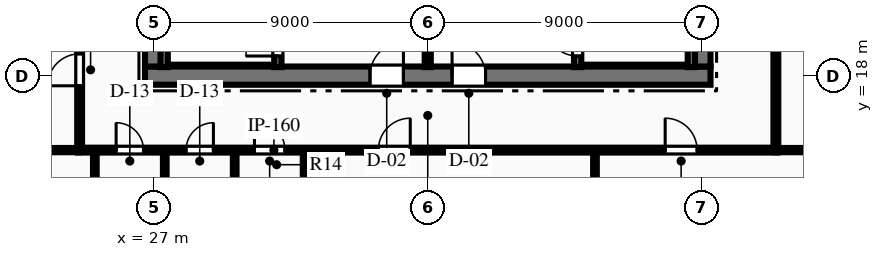
"""IFC4 building model, lengths in metres.
Left out: names, types, materials, properties, quantities, classifications, styles, units other than length and angle.
Written with IfcOpenShell. Run it as: python <this file> out.ifc"""

import sys

from ifc_helpers import new_model, si_unit, direction, frame, frame_2d, origin, place, context, subcontext, project, spatial, rectangle, extrude, element, fill, save


model = new_model("IFC4")
c1 = context("Model", 3, precision=1e-05, world=origin(), true_north=direction((0.0, 1.0)))
c2 = subcontext(c1, "Body", "Model", "MODEL_VIEW")
j1 = project(units=[si_unit("LENGTHUNIT", "METRE"), si_unit("PLANEANGLEUNIT", "RADIAN")], contexts=[c1])
p1 = place(None, origin())
s1 = spatial("IfcSite", under=j1, at=p1, CompositionType="ELEMENT")
p2 = place(p1, origin())
s2 = spatial("IfcBuilding", under=s1, at=p2, CompositionType="ELEMENT")
p3 = place(p2, frame((0.0, 0.0, 40.2)))
s3 = spatial("IfcBuildingStorey", under=s2, at=p3, CompositionType="ELEMENT", Elevation=40.2)
p4 = place(p3, frame((26.7, 18.0, 0.0), z_axis=(0.0, 0.0, 1.0), x_axis=(1.0, 0.0, 0.0)))
e1 = element("IfcWall", 1, at=p4, inside=s3, PredefinedType="SHEAR", context=c2, shape_type="SweptSolid", body=[
    extrude(rectangle(XDim=18.6, YDim=0.6, at=frame_2d((9.3, 0.0))), origin(), (0.0, 0.0, 1.0), 3.75),
])
p5 = place(p4, frame((7.4, 0.0, 0.0)))
e2 = element("IfcOpeningElement", 2, at=p5, cuts=e1, PredefinedType="OPENING", context=c2, shape_type="SweptSolid", body=[
    extrude(rectangle(XDim=1.1, YDim=2.15, at=frame_2d((0.55, 1.075))), frame((0.0, 0.31, 0.0), z_axis=(0.0, -1.0, 0.0), x_axis=(1.0, 0.0, 0.0)), (0.0, 0.0, 1.0), 0.62),
])
p6 = place(p4, frame((10.1, 0.0, 0.0)))
e3 = element("IfcOpeningElement", 3, at=p6, cuts=e1, PredefinedType="OPENING", context=c2, shape_type="SweptSolid", body=[
    extrude(rectangle(XDim=1.1, YDim=2.15, at=frame_2d((0.55, 1.075))), frame((0.0, 0.31, 0.0), z_axis=(0.0, -1.0, 0.0), x_axis=(1.0, 0.0, 0.0)), (0.0, 0.0, 1.0), 0.62),
])
p7 = place(p3, frame((27.0, 18.3, 0.0), z_axis=(0.0, 0.0, 1.0), x_axis=(0.0, 1.0, 0.0)))
e4 = element("IfcWall", 4, at=p7, inside=s3, PredefinedType="SHEAR", context=c2, shape_type="SweptSolid", body=[
    extrude(rectangle(XDim=15.4, YDim=0.6, at=frame_2d((7.7, 0.0))), origin(), (0.0, 0.0, 1.0), 3.75),
])
p8 = place(p7, frame((9.94, 0.0, 0.0)))
e5 = element("IfcOpeningElement", 5, at=p8, cuts=e4, PredefinedType="OPENING", context=c2, shape_type="SweptSolid", body=[
    extrude(rectangle(XDim=1.4, YDim=2.2, at=frame_2d((0.7, 1.1))), frame((0.0, 0.31, 0.0), z_axis=(0.0, -1.0, 0.0), x_axis=(1.0, 0.0, 0.0)), (0.0, 0.0, 1.0), 0.62),
])
p9 = place(p3, frame((45.0, 18.3, 0.0), z_axis=(0.0, 0.0, 1.0), x_axis=(0.0, 1.0, 0.0)))
e6 = element("IfcWall", 6, at=p9, inside=s3, PredefinedType="SHEAR", context=c2, shape_type="SweptSolid", body=[
    extrude(rectangle(XDim=15.4, YDim=0.6, at=frame_2d((7.7, 0.0))), origin(), (0.0, 0.0, 1.0), 3.75),
])
p10 = place(p9, frame((9.94, 0.0, 0.0)))
e7 = element("IfcOpeningElement", 7, at=p10, cuts=e6, PredefinedType="OPENING", context=c2, shape_type="SweptSolid", body=[
    extrude(rectangle(XDim=1.4, YDim=2.2, at=frame_2d((0.7, 1.1))), frame((0.0, 0.31, 0.0), z_axis=(0.0, -1.0, 0.0), x_axis=(1.0, 0.0, 0.0)), (0.0, 0.0, 1.0), 0.62),
])
p11 = place(p3, frame((31.07, 18.28, 0.0), z_axis=(0.0, 0.0, 1.0), x_axis=(0.0, 1.0, 0.0)))
e8 = element("IfcWall", 8, at=p11, inside=s3, PredefinedType="SHEAR", context=c2, shape_type="SweptSolid", body=[
    extrude(rectangle(XDim=8.26, YDim=0.24, at=frame_2d((4.13, 0.0))), origin(), (0.0, 0.0, 1.0), 3.75),
])
p12 = place(p11, frame((0.365, 0.0, 0.0)))
e9 = element("IfcOpeningElement", 9, at=p12, cuts=e8, PredefinedType="OPENING", context=c2, shape_type="SweptSolid", body=[
    extrude(rectangle(XDim=1.05, YDim=2.15, at=frame_2d((0.525, 1.075))), frame((0.0, 0.13, 0.0), z_axis=(0.0, -1.0, 0.0), x_axis=(1.0, 0.0, 0.0)), (0.0, 0.0, 1.0), 0.26),
])
p13 = place(p3, frame((27.33, 18.28, 0.0), z_axis=(0.0, 0.0, 1.0), x_axis=(0.0, 1.0, 0.0)))
e10 = element("IfcWall", 10, at=p13, inside=s3, PredefinedType="SHEAR", context=c2, shape_type="SweptSolid", body=[
    extrude(rectangle(XDim=8.26, YDim=0.24, at=frame_2d((4.13, 0.0))), origin(), (0.0, 0.0, 1.0), 3.75),
])
p14 = place(p3, frame((40.93, 18.28, 0.0), z_axis=(0.0, 0.0, 1.0), x_axis=(0.0, 1.0, 0.0)))
e11 = element("IfcWall", 11, at=p14, inside=s3, PredefinedType="SHEAR", context=c2, shape_type="SweptSolid", body=[
    extrude(rectangle(XDim=8.26, YDim=0.24, at=frame_2d((4.13, 0.0))), origin(), (0.0, 0.0, 1.0), 3.75),
])
p15 = place(p14, frame((0.365, 0.0, 0.0)))
e12 = element("IfcOpeningElement", 12, at=p15, cuts=e11, PredefinedType="OPENING", context=c2, shape_type="SweptSolid", body=[
    extrude(rectangle(XDim=1.05, YDim=2.15, at=frame_2d((0.525, 1.075))), frame((0.0, 0.13, 0.0), z_axis=(0.0, -1.0, 0.0), x_axis=(1.0, 0.0, 0.0)), (0.0, 0.0, 1.0), 0.26),
])
p16 = place(p3, frame((44.67, 18.28, 0.0), z_axis=(0.0, 0.0, 1.0), x_axis=(0.0, 1.0, 0.0)))
e13 = element("IfcWall", 13, at=p16, inside=s3, PredefinedType="SHEAR", context=c2, shape_type="SweptSolid", body=[
    extrude(rectangle(XDim=8.26, YDim=0.24, at=frame_2d((4.13, 0.0))), origin(), (0.0, 0.0, 1.0), 3.75),
])
p17 = place(p3, frame((36.0, 18.28, 0.0), z_axis=(0.0, 0.0, 1.0), x_axis=(0.0, 1.0, 0.0)))
e14 = element("IfcWall", 14, at=p17, inside=s3, PredefinedType="PARTITIONING", context=c2, shape_type="SweptSolid", body=[
    extrude(rectangle(XDim=3.77, YDim=0.2, at=frame_2d((1.885, 0.0))), origin(), (0.0, 0.0, 1.0), 3.44),
])
p18 = place(p3, frame((24.5, 15.55, 0.0), z_axis=(0.0, 0.0, 1.0), x_axis=(1.0, 0.0, 0.0)))
e15 = element("IfcWall", 15, at=p18, inside=s3, PredefinedType="PARTITIONING", context=c2, shape_type="SweptSolid", body=[
    extrude(rectangle(XDim=23.0, YDim=0.16, at=frame_2d((11.5, 0.0))), origin(), (0.0, 0.0, 1.0), 3.44),
])
p19 = place(p18, frame((1.25, 0.0, 0.0)))
e16 = element("IfcOpeningElement", 16, at=p19, cuts=e15, PredefinedType="OPENING", context=c2, shape_type="SweptSolid", body=[
    extrude(rectangle(XDim=0.9, YDim=2.15, at=frame_2d((0.45, 1.075))), frame((0.0, 0.09, 0.0), z_axis=(0.0, -1.0, 0.0), x_axis=(1.0, 0.0, 0.0)), (0.0, 0.0, 1.0), 0.18),
])
p20 = place(p18, frame((3.55, 0.0, 0.0)))
e17 = element("IfcOpeningElement", 17, at=p20, cuts=e15, PredefinedType="OPENING", context=c2, shape_type="SweptSolid", body=[
    extrude(rectangle(XDim=0.9, YDim=2.15, at=frame_2d((0.45, 1.075))), frame((0.0, 0.09, 0.0), z_axis=(0.0, -1.0, 0.0), x_axis=(1.0, 0.0, 0.0)), (0.0, 0.0, 1.0), 0.18),
])
p21 = place(p18, frame((5.8, 0.0, 0.0)))
e18 = element("IfcOpeningElement", 18, at=p21, cuts=e15, PredefinedType="OPENING", context=c2, shape_type="SweptSolid", body=[
    extrude(rectangle(XDim=1.0, YDim=2.15, at=frame_2d((0.5, 1.075))), frame((0.0, 0.09, 0.0), z_axis=(0.0, -1.0, 0.0), x_axis=(1.0, 0.0, 0.0)), (0.0, 0.0, 1.0), 0.18),
])
p22 = place(p18, frame((9.875, 0.0, 0.0)))
e19 = element("IfcOpeningElement", 19, at=p22, cuts=e15, PredefinedType="OPENING", context=c2, shape_type="SweptSolid", body=[
    extrude(rectangle(XDim=1.05, YDim=2.15, at=frame_2d((0.525, 1.075))), frame((0.0, 0.09, 0.0), z_axis=(0.0, -1.0, 0.0), x_axis=(1.0, 0.0, 0.0)), (0.0, 0.0, 1.0), 0.18),
])
p23 = place(p18, frame((19.309, 0.0, 0.0)))
e20 = element("IfcOpeningElement", 20, at=p23, cuts=e15, PredefinedType="OPENING", context=c2, shape_type="SweptSolid", body=[
    extrude(rectangle(XDim=1.05, YDim=2.15, at=frame_2d((0.525, 1.075))), frame((0.0, 0.09, 0.0), z_axis=(0.0, -1.0, 0.0), x_axis=(1.0, 0.0, 0.0)), (0.0, 0.0, 1.0), 0.18),
])
p24 = place(p3, frame((24.55, 15.55, 0.0), z_axis=(0.0, 0.0, 1.0), x_axis=(0.0, 1.0, 0.0)))
e21 = element("IfcWall", 21, at=p24, inside=s3, PredefinedType="PARTITIONING", context=c2, shape_type="SweptSolid", body=[
    extrude(rectangle(XDim=20.9, YDim=0.16, at=frame_2d((10.45, 0.0))), origin(), (0.0, 0.0, 1.0), 3.44),
])
p25 = place(p24, frame((2.116, 0.0, 0.0)))
e22 = element("IfcOpeningElement", 22, at=p25, cuts=e21, PredefinedType="OPENING", context=c2, shape_type="SweptSolid", body=[
    extrude(rectangle(XDim=1.05, YDim=2.15, at=frame_2d((0.525, 1.075))), frame((0.0, 0.09, 0.0), z_axis=(0.0, -1.0, 0.0), x_axis=(1.0, 0.0, 0.0)), (0.0, 0.0, 1.0), 0.18),
])
p26 = place(p24, frame((8.625, 0.0, 0.0)))
e23 = element("IfcOpeningElement", 23, at=p26, cuts=e21, PredefinedType="OPENING", context=c2, shape_type="SweptSolid", body=[
    extrude(rectangle(XDim=1.05, YDim=2.15, at=frame_2d((0.525, 1.075))), frame((0.0, 0.09, 0.0), z_axis=(0.0, -1.0, 0.0), x_axis=(1.0, 0.0, 0.0)), (0.0, 0.0, 1.0), 0.18),
])
p27 = place(p24, frame((13.945, 0.0, 0.0)))
e24 = element("IfcOpeningElement", 24, at=p27, cuts=e21, PredefinedType="OPENING", context=c2, shape_type="SweptSolid", body=[
    extrude(rectangle(XDim=1.05, YDim=2.15, at=frame_2d((0.525, 1.075))), frame((0.0, 0.09, 0.0), z_axis=(0.0, -1.0, 0.0), x_axis=(1.0, 0.0, 0.0)), (0.0, 0.0, 1.0), 0.18),
])
p28 = place(p24, frame((16.783, 0.0, 0.0)))
e25 = element("IfcOpeningElement", 25, at=p28, cuts=e21, PredefinedType="OPENING", context=c2, shape_type="SweptSolid", body=[
    extrude(rectangle(XDim=1.05, YDim=2.15, at=frame_2d((0.525, 1.075))), frame((0.0, 0.09, 0.0), z_axis=(0.0, -1.0, 0.0), x_axis=(1.0, 0.0, 0.0)), (0.0, 0.0, 1.0), 0.18),
])
p29 = place(p3, frame((47.45, 15.55, 0.0), z_axis=(0.0, 0.0, 1.0), x_axis=(0.0, 1.0, 0.0)))
e26 = element("IfcWall", 26, at=p29, inside=s3, PredefinedType="PARTITIONING", context=c2, shape_type="SweptSolid", body=[
    extrude(rectangle(XDim=20.9, YDim=0.16, at=frame_2d((10.45, 0.0))), origin(), (0.0, 0.0, 1.0), 3.44),
])
p30 = place(p29, frame((6.163, 0.0, 0.0)))
e27 = element("IfcOpeningElement", 27, at=p30, cuts=e26, PredefinedType="OPENING", context=c2, shape_type="SweptSolid", body=[
    extrude(rectangle(XDim=1.05, YDim=2.15, at=frame_2d((0.525, 1.075))), frame((0.0, 0.09, 0.0), z_axis=(0.0, -1.0, 0.0), x_axis=(1.0, 0.0, 0.0)), (0.0, 0.0, 1.0), 0.18),
])
for number, where, z_axis, x_axis in (
    (28, (25.05, 11.65, 0.0), (0.0, 0.0, 1.0), (0.0, 1.0, 0.0)),
    (29, (27.35, 11.65, 0.0), (0.0, 0.0, 1.0), (0.0, 1.0, 0.0)),
    (30, (29.65, 11.65, 0.0), (0.0, 0.0, 1.0), (0.0, 1.0, 0.0)),
    (31, (31.95, 11.65, 0.0), (0.0, 0.0, 1.0), (0.0, 1.0, 0.0)),
):
    element("IfcWall", number, at=place(p3, frame(where, z_axis=z_axis, x_axis=x_axis)), inside=s3, PredefinedType="PARTITIONING", context=c2, shape_type="SweptSolid", body=[
        extrude(rectangle(XDim=3.9, YDim=0.12, at=frame_2d((1.95, 0.0))), origin(), (0.0, 0.0, 1.0), 3.44),
    ])
p31 = place(p3, frame((9.621, 15.55, 0.0), z_axis=(0.0, 0.0, 1.0), x_axis=(1.0, 0.0, 0.0)))
e32 = element("IfcWall", 32, at=p31, inside=s3, PredefinedType="PARTITIONING", context=c2, shape_type="SweptSolid", body=[
    extrude(rectangle(XDim=14.929, YDim=0.14, at=frame_2d((7.464, 0.0))), origin(), (0.0, 0.0, 1.0), 3.44),
])
p32 = place(p3, frame((47.45, 15.55, 0.0), z_axis=(0.0, 0.0, 1.0), x_axis=(1.0, 0.0, 0.0)))
e33 = element("IfcWall", 33, at=p32, inside=s3, PredefinedType="PARTITIONING", context=c2, shape_type="SweptSolid", body=[
    extrude(rectangle(XDim=16.189, YDim=0.14, at=frame_2d((8.094, 0.0))), origin(), (0.0, 0.0, 1.0), 3.44),
])
p33 = place(p32, frame((5.485, 0.0, 0.0)))
e34 = element("IfcOpeningElement", 34, at=p33, cuts=e33, PredefinedType="OPENING", context=c2, shape_type="SweptSolid", body=[
    extrude(rectangle(XDim=0.95, YDim=2.15, at=frame_2d((0.475, 1.075))), frame((0.0, 0.08, 0.0), z_axis=(0.0, -1.0, 0.0), x_axis=(1.0, 0.0, 0.0)), (0.0, 0.0, 1.0), 0.16),
])
p34 = place(p3, frame((41.5, 1.326, 0.0), z_axis=(0.0, 0.0, 1.0), x_axis=(0.0, 1.0, 0.0)))
e35 = element("IfcWall", 35, at=p34, inside=s3, PredefinedType="PARTITIONING", context=c2, shape_type="SweptSolid", body=[
    extrude(rectangle(XDim=14.224, YDim=0.12, at=frame_2d((7.112, 0.0))), origin(), (0.0, 0.0, 1.0), 3.44),
])
p35 = place(p12, origin())
e36 = element("IfcDoor", 36, at=p35, inside=s3, OperationType="SINGLE_SWING_LEFT", PredefinedType="DOOR", context=c2, shape_type="SweptSolid", body=[
    extrude(rectangle(XDim=1.05, YDim=2.15, at=frame_2d((0.525, 1.075))), frame((0.0, 0.025, 0.0), z_axis=(0.0, -1.0, 0.0), x_axis=(1.0, 0.0, 0.0)), (0.0, 0.0, 1.0), 0.05),
])
fill(e9, e36)
p36 = place(p15, origin())
e37 = element("IfcDoor", 37, at=p36, inside=s3, OperationType="SINGLE_SWING_RIGHT", PredefinedType="DOOR", context=c2, shape_type="SweptSolid", body=[
    extrude(rectangle(XDim=1.05, YDim=2.15, at=frame_2d((0.525, 1.075))), frame((0.0, 0.025, 0.0), z_axis=(0.0, -1.0, 0.0), x_axis=(1.0, 0.0, 0.0)), (0.0, 0.0, 1.0), 0.05),
])
fill(e12, e37)
p37 = place(p5, origin())
e38 = element("IfcDoor", 38, at=p37, inside=s3, OperationType="SINGLE_SWING_RIGHT", PredefinedType="DOOR", context=c2, shape_type="SweptSolid", body=[
    extrude(rectangle(XDim=1.1, YDim=2.15, at=frame_2d((0.55, 1.075))), frame((0.0, 0.025, 0.0), z_axis=(0.0, -1.0, 0.0), x_axis=(1.0, 0.0, 0.0)), (0.0, 0.0, 1.0), 0.05),
])
fill(e2, e38)
p38 = place(p6, origin())
e39 = element("IfcDoor", 39, at=p38, inside=s3, OperationType="SINGLE_SWING_LEFT", PredefinedType="DOOR", context=c2, shape_type="SweptSolid", body=[
    extrude(rectangle(XDim=1.1, YDim=2.15, at=frame_2d((0.55, 1.075))), frame((0.0, 0.025, 0.0), z_axis=(0.0, -1.0, 0.0), x_axis=(1.0, 0.0, 0.0)), (0.0, 0.0, 1.0), 0.05),
])
fill(e3, e39)
p39 = place(p19, origin())
e40 = element("IfcDoor", 40, at=p39, inside=s3, OperationType="SINGLE_SWING_LEFT", PredefinedType="DOOR", context=c2, shape_type="SweptSolid", body=[
    extrude(rectangle(XDim=0.9, YDim=2.15, at=frame_2d((0.45, 1.075))), frame((0.0, 0.025, 0.0), z_axis=(0.0, -1.0, 0.0), x_axis=(1.0, 0.0, 0.0)), (0.0, 0.0, 1.0), 0.05),
])
fill(e16, e40)
p40 = place(p20, origin())
e41 = element("IfcDoor", 41, at=p40, inside=s3, OperationType="SINGLE_SWING_RIGHT", PredefinedType="DOOR", context=c2, shape_type="SweptSolid", body=[
    extrude(rectangle(XDim=0.9, YDim=2.15, at=frame_2d((0.45, 1.075))), frame((0.0, 0.025, 0.0), z_axis=(0.0, -1.0, 0.0), x_axis=(1.0, 0.0, 0.0)), (0.0, 0.0, 1.0), 0.05),
])
fill(e17, e41)
p41 = place(p21, origin())
e42 = element("IfcDoor", 42, at=p41, inside=s3, OperationType="SINGLE_SWING_LEFT", PredefinedType="DOOR", context=c2, shape_type="SweptSolid", body=[
    extrude(rectangle(XDim=1.0, YDim=2.15, at=frame_2d((0.5, 1.075))), frame((0.0, 0.025, 0.0), z_axis=(0.0, -1.0, 0.0), x_axis=(1.0, 0.0, 0.0)), (0.0, 0.0, 1.0), 0.05),
])
fill(e18, e42)
p42 = place(p22, origin())
e43 = element("IfcDoor", 43, at=p42, inside=s3, OperationType="SINGLE_SWING_RIGHT", PredefinedType="DOOR", context=c2, shape_type="SweptSolid", body=[
    extrude(rectangle(XDim=1.05, YDim=2.15, at=frame_2d((0.525, 1.075))), frame((0.0, 0.025, 0.0), z_axis=(0.0, -1.0, 0.0), x_axis=(1.0, 0.0, 0.0)), (0.0, 0.0, 1.0), 0.05),
])
fill(e19, e43)
p43 = place(p23, origin())
e44 = element("IfcDoor", 44, at=p43, inside=s3, OperationType="SINGLE_SWING_LEFT", PredefinedType="DOOR", context=c2, shape_type="SweptSolid", body=[
    extrude(rectangle(XDim=1.05, YDim=2.15, at=frame_2d((0.525, 1.075))), frame((0.0, 0.025, 0.0), z_axis=(0.0, -1.0, 0.0), x_axis=(1.0, 0.0, 0.0)), (0.0, 0.0, 1.0), 0.05),
])
fill(e20, e44)
p44 = place(p25, origin())
e45 = element("IfcDoor", 45, at=p44, inside=s3, OperationType="SINGLE_SWING_LEFT", PredefinedType="DOOR", context=c2, shape_type="SweptSolid", body=[
    extrude(rectangle(XDim=1.05, YDim=2.15, at=frame_2d((0.525, 1.075))), frame((0.0, 0.025, 0.0), z_axis=(0.0, -1.0, 0.0), x_axis=(1.0, 0.0, 0.0)), (0.0, 0.0, 1.0), 0.05),
])
fill(e22, e45)
save(model, sys.argv[1])
